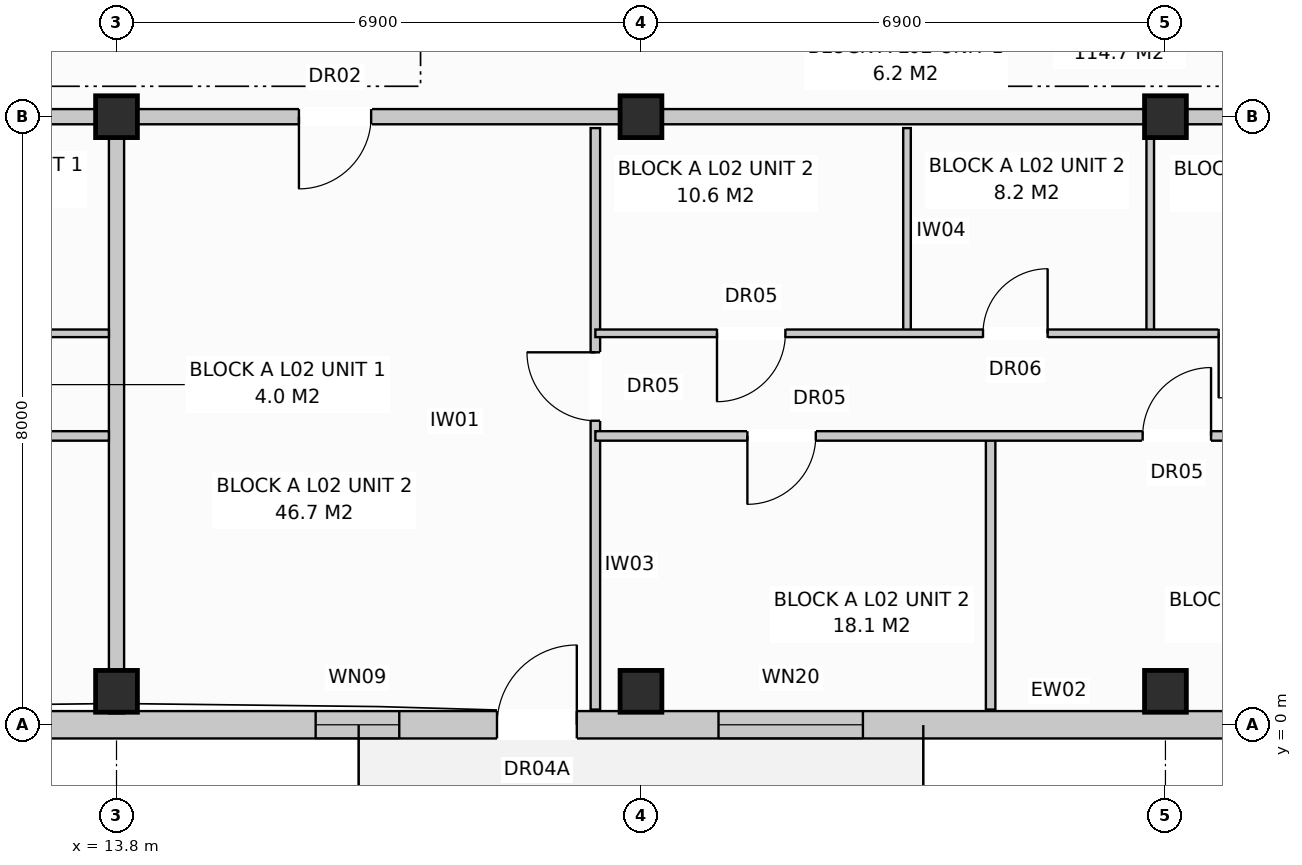
"""IFC4 building model, lengths in metres.
Left out: names, types, materials, properties, quantities, classifications, styles, units other than length and angle.
Written with IfcOpenShell. Run it as: python <this file> out.ifc"""

import sys

from ifc_helpers import new_model, si_unit, direction, frame, frame_2d, origin, origin_with_axes, origin_2d, place, context, subcontext, project, spatial, rectangle, extrude, element, fill, save


model = new_model("IFC4")
c1 = context("Model", 3, precision=1e-05, world=origin(), true_north=direction((0.0, 1.0)))
c2 = subcontext(c1, "Body", "Model", "MODEL_VIEW")
j1 = project(units=[si_unit("LENGTHUNIT", "METRE"), si_unit("PLANEANGLEUNIT", "RADIAN")], contexts=[c1])
p1 = place(None, origin())
s1 = spatial("IfcSite", under=j1, at=p1, CompositionType="ELEMENT")
p2 = place(p1, origin())
s2 = spatial("IfcBuilding", under=s1, at=p2, CompositionType="ELEMENT")
p3 = place(p2, frame((0.0, 0.0, 8.0)))
s3 = spatial("IfcBuildingStorey", under=s2, at=p3, CompositionType="ELEMENT", Elevation=8.0)
for number, where, z_axis, x_axis in (
    (1, (13.8, 0.44, 0.0), (0.0, 0.0, 1.0), (1.0, 0.0, 0.0)),
    (2, (13.8, 8.0, 0.0), (0.0, 0.0, 1.0), (1.0, 0.0, 0.0)),
    (3, (20.7, 0.44, 0.0), (0.0, 0.0, 1.0), (1.0, 0.0, 0.0)),
    (4, (20.7, 8.0, 0.0), (0.0, 0.0, 1.0), (1.0, 0.0, 0.0)),
    (5, (27.6, 0.44, 0.0), (0.0, 0.0, 1.0), (1.0, 0.0, 0.0)),
    (6, (27.6, 8.0, 0.0), (0.0, 0.0, 1.0), (1.0, 0.0, 0.0)),
):
    element("IfcColumn", number, at=place(p3, frame(where, z_axis=z_axis, x_axis=x_axis)), inside=s3, PredefinedType="COLUMN", context=c2, shape_type="SweptSolid", body=[
        extrude(rectangle(XDim=0.55, YDim=0.55, at=origin_2d()), origin(), (0.0, 0.0, 1.0), 3.2),
    ])
p4 = place(p3, frame((0.17, 0.0, 0.0), z_axis=(0.0, 0.0, 1.0), x_axis=(1.0, 0.0, 0.0)))
e7 = element("IfcWall", 7, at=p4, inside=s3, PredefinedType="STANDARD", context=c2, shape_type="SweptSolid", body=[
    extrude(rectangle(XDim=54.86, YDim=0.36, at=frame_2d((27.43, 0.0))), origin(), (0.0, 0.0, 1.0), 2.94),
])
p5 = place(p4, frame((3.736, 0.0, 0.0)))
e8 = element("IfcOpeningElement", 8, at=p5, cuts=e7, PredefinedType="OPENING", context=c2, shape_type="SweptSolid", body=[
    extrude(rectangle(XDim=1.05, YDim=2.12, at=frame_2d((0.525, 1.06))), frame((0.0, 0.192, 0.0), z_axis=(0.0, -1.0, 0.0), x_axis=(1.0, 0.0, 0.0)), (0.0, 0.0, 1.0), 0.384),
])
p6 = place(p4, frame((18.636, 0.0, 0.0)))
e9 = element("IfcOpeningElement", 9, at=p6, cuts=e7, PredefinedType="OPENING", context=c2, shape_type="SweptSolid", body=[
    extrude(rectangle(XDim=1.05, YDim=2.12, at=frame_2d((0.525, 1.06))), frame((0.0, 0.192, 0.0), z_axis=(0.0, -1.0, 0.0), x_axis=(1.0, 0.0, 0.0)), (0.0, 0.0, 1.0), 0.384),
])
p7 = place(p4, frame((32.636, 0.0, 0.0)))
e10 = element("IfcOpeningElement", 10, at=p7, cuts=e7, PredefinedType="OPENING", context=c2, shape_type="SweptSolid", body=[
    extrude(rectangle(XDim=1.05, YDim=2.12, at=frame_2d((0.525, 1.06))), frame((0.0, 0.192, 0.0), z_axis=(0.0, -1.0, 0.0), x_axis=(1.0, 0.0, 0.0)), (0.0, 0.0, 1.0), 0.384),
])
p8 = place(p4, frame((46.441, 0.0, 0.0)))
e11 = element("IfcOpeningElement", 11, at=p8, cuts=e7, PredefinedType="OPENING", context=c2, shape_type="SweptSolid", body=[
    extrude(rectangle(XDim=1.05, YDim=2.12, at=frame_2d((0.525, 1.06))), frame((0.0, 0.192, 0.0), z_axis=(0.0, -1.0, 0.0), x_axis=(1.0, 0.0, 0.0)), (0.0, 0.0, 1.0), 0.384),
])
p9 = place(p4, frame((1.95, 0.0, 0.72)))
e12 = element("IfcOpeningElement", 12, at=p9, cuts=e7, PredefinedType="OPENING", context=c2, shape_type="SweptSolid", body=[
    extrude(rectangle(XDim=1.1, YDim=1.5, at=frame_2d((0.55, 0.75))), frame((0.0, 0.192, 0.0), z_axis=(0.0, -1.0, 0.0), x_axis=(1.0, 0.0, 0.0)), (0.0, 0.0, 1.0), 0.384),
])
p10 = place(p4, frame((7.232, 0.0, 0.72)))
e13 = element("IfcOpeningElement", 13, at=p10, cuts=e7, PredefinedType="OPENING", context=c2, shape_type="SweptSolid", body=[
    extrude(rectangle(XDim=1.9, YDim=1.85, at=frame_2d((0.95, 0.925))), frame((0.0, 0.192, 0.0), z_axis=(0.0, -1.0, 0.0), x_axis=(1.0, 0.0, 0.0)), (0.0, 0.0, 1.0), 0.384),
])
p11 = place(p4, frame((10.85, 0.0, 0.72)))
e14 = element("IfcOpeningElement", 14, at=p11, cuts=e7, PredefinedType="OPENING", context=c2, shape_type="SweptSolid", body=[
    extrude(rectangle(XDim=1.1, YDim=1.5, at=frame_2d((0.55, 0.75))), frame((0.0, 0.192, 0.0), z_axis=(0.0, -1.0, 0.0), x_axis=(1.0, 0.0, 0.0)), (0.0, 0.0, 1.0), 0.384),
])
p12 = place(p4, frame((16.25, 0.0, 0.72)))
e15 = element("IfcOpeningElement", 15, at=p12, cuts=e7, PredefinedType="OPENING", context=c2, shape_type="SweptSolid", body=[
    extrude(rectangle(XDim=1.1, YDim=1.5, at=frame_2d((0.55, 0.75))), frame((0.0, 0.192, 0.0), z_axis=(0.0, -1.0, 0.0), x_axis=(1.0, 0.0, 0.0)), (0.0, 0.0, 1.0), 0.384),
])
p13 = place(p4, frame((21.55, 0.0, 0.72)))
e16 = element("IfcOpeningElement", 16, at=p13, cuts=e7, PredefinedType="OPENING", context=c2, shape_type="SweptSolid", body=[
    extrude(rectangle(XDim=1.9, YDim=1.85, at=frame_2d((0.95, 0.925))), frame((0.0, 0.192, 0.0), z_axis=(0.0, -1.0, 0.0), x_axis=(1.0, 0.0, 0.0)), (0.0, 0.0, 1.0), 0.384),
])
p14 = place(p4, frame((28.35, 0.0, 0.72)))
e17 = element("IfcOpeningElement", 17, at=p14, cuts=e7, PredefinedType="OPENING", context=c2, shape_type="SweptSolid", body=[
    extrude(rectangle(XDim=1.1, YDim=1.5, at=frame_2d((0.55, 0.75))), frame((0.0, 0.192, 0.0), z_axis=(0.0, -1.0, 0.0), x_axis=(1.0, 0.0, 0.0)), (0.0, 0.0, 1.0), 0.384),
])
p15 = place(p4, frame((30.8, 0.0, 0.85)))
e18 = element("IfcOpeningElement", 18, at=p15, cuts=e7, PredefinedType="OPENING", context=c2, shape_type="SweptSolid", body=[
    extrude(rectangle(XDim=1.5, YDim=1.65, at=frame_2d((0.75, 0.825))), frame((0.0, 0.192, 0.0), z_axis=(0.0, -1.0, 0.0), x_axis=(1.0, 0.0, 0.0)), (0.0, 0.0, 1.0), 0.384),
])
p16 = place(p4, frame((35.55, 0.0, 0.72)))
e19 = element("IfcOpeningElement", 19, at=p16, cuts=e7, PredefinedType="OPENING", context=c2, shape_type="SweptSolid", body=[
    extrude(rectangle(XDim=1.9, YDim=1.85, at=frame_2d((0.95, 0.925))), frame((0.0, 0.192, 0.0), z_axis=(0.0, -1.0, 0.0), x_axis=(1.0, 0.0, 0.0)), (0.0, 0.0, 1.0), 0.384),
])
p17 = place(p4, frame((39.25, 0.0, 0.72)))
e20 = element("IfcOpeningElement", 20, at=p17, cuts=e7, PredefinedType="OPENING", context=c2, shape_type="SweptSolid", body=[
    extrude(rectangle(XDim=1.1, YDim=1.5, at=frame_2d((0.55, 0.75))), frame((0.0, 0.192, 0.0), z_axis=(0.0, -1.0, 0.0), x_axis=(1.0, 0.0, 0.0)), (0.0, 0.0, 1.0), 0.384),
])
p18 = place(p4, frame((44.3, 0.0, 0.8)))
e21 = element("IfcOpeningElement", 21, at=p18, cuts=e7, PredefinedType="OPENING", context=c2, shape_type="SweptSolid", body=[
    extrude(rectangle(XDim=1.8, YDim=1.7, at=frame_2d((0.9, 0.85))), frame((0.0, 0.192, 0.0), z_axis=(0.0, -1.0, 0.0), x_axis=(1.0, 0.0, 0.0)), (0.0, 0.0, 1.0), 0.384),
])
p19 = place(p4, frame((49.15, 0.0, 0.72)))
e22 = element("IfcOpeningElement", 22, at=p19, cuts=e7, PredefinedType="OPENING", context=c2, shape_type="SweptSolid", body=[
    extrude(rectangle(XDim=1.9, YDim=1.85, at=frame_2d((0.95, 0.925))), frame((0.0, 0.192, 0.0), z_axis=(0.0, -1.0, 0.0), x_axis=(1.0, 0.0, 0.0)), (0.0, 0.0, 1.0), 0.384),
])
p20 = place(p4, frame((52.95, 0.0, 0.72)))
e23 = element("IfcOpeningElement", 23, at=p20, cuts=e7, PredefinedType="OPENING", context=c2, shape_type="SweptSolid", body=[
    extrude(rectangle(XDim=1.1, YDim=1.5, at=frame_2d((0.55, 0.75))), frame((0.0, 0.192, 0.0), z_axis=(0.0, -1.0, 0.0), x_axis=(1.0, 0.0, 0.0)), (0.0, 0.0, 1.0), 0.384),
])
p21 = place(p3, frame((13.8, 7.85, 0.0), z_axis=(0.0, 0.0, 1.0), x_axis=(0.0, -1.0, 0.0)))
e24 = element("IfcWall", 24, at=p21, inside=s3, PredefinedType="PARTITIONING", context=c2, shape_type="SweptSolid", body=[
    extrude(rectangle(XDim=7.7, YDim=0.2, at=frame_2d((3.85, 0.0))), origin(), (0.0, 0.0, 1.0), 2.94),
])
p22 = place(p3, frame((0.0, 8.0, 0.0), z_axis=(0.0, 0.0, 1.0), x_axis=(1.0, 0.0, 0.0)))
e25 = element("IfcWall", 25, at=p22, inside=s3, PredefinedType="PARTITIONING", context=c2, shape_type="SweptSolid", body=[
    extrude(rectangle(XDim=13.8, YDim=0.2, at=frame_2d((6.9, 0.0))), origin(), (0.0, 0.0, 1.0), 2.38),
])
p23 = place(p22, frame((2.4, 0.0, 0.0)))
e26 = element("IfcOpeningElement", 26, at=p23, cuts=e25, PredefinedType="OPENING", context=c2, shape_type="SweptSolid", body=[
    extrude(rectangle(XDim=0.95, YDim=2.15, at=frame_2d((0.475, 1.075))), frame((0.0, 0.112, 0.0), z_axis=(0.0, -1.0, 0.0), x_axis=(1.0, 0.0, 0.0)), (0.0, 0.0, 1.0), 0.224),
])
p24 = place(p3, frame((5.2, 5.15, 0.0), z_axis=(0.0, 0.0, 1.0), x_axis=(1.0, 0.0, 0.0)))
e27 = element("IfcWall", 27, at=p24, inside=s3, PredefinedType="PARTITIONING", context=c2, shape_type="SweptSolid", body=[
    extrude(rectangle(XDim=8.5, YDim=0.1, at=frame_2d((4.25, 0.0))), origin(), (0.0, 0.0, 1.0), 2.94),
])
p25 = place(p24, frame((1.0, 0.0, 0.0)))
e28 = element("IfcOpeningElement", 28, at=p25, cuts=e27, PredefinedType="OPENING", context=c2, shape_type="SweptSolid", body=[
    extrude(rectangle(XDim=0.85, YDim=2.1, at=frame_2d((0.425, 1.05))), frame((0.0, 0.062, 0.0), z_axis=(0.0, -1.0, 0.0), x_axis=(1.0, 0.0, 0.0)), (0.0, 0.0, 1.0), 0.124),
])
p26 = place(p24, frame((3.4, 0.0, 0.0)))
e29 = element("IfcOpeningElement", 29, at=p26, cuts=e27, PredefinedType="OPENING", context=c2, shape_type="SweptSolid", body=[
    extrude(rectangle(XDim=0.85, YDim=2.05, at=frame_2d((0.425, 1.025))), frame((0.0, 0.062, 0.0), z_axis=(0.0, -1.0, 0.0), x_axis=(1.0, 0.0, 0.0)), (0.0, 0.0, 1.0), 0.124),
])
p27 = place(p24, frame((6.2, 0.0, 0.0)))
e30 = element("IfcOpeningElement", 30, at=p27, cuts=e27, PredefinedType="OPENING", context=c2, shape_type="SweptSolid", body=[
    extrude(rectangle(XDim=0.85, YDim=2.05, at=frame_2d((0.425, 1.025))), frame((0.0, 0.062, 0.0), z_axis=(0.0, -1.0, 0.0), x_axis=(1.0, 0.0, 0.0)), (0.0, 0.0, 1.0), 0.124),
])
p28 = place(p3, frame((5.2, 3.8, 0.0), z_axis=(0.0, 0.0, 1.0), x_axis=(1.0, 0.0, 0.0)))
e31 = element("IfcWall", 31, at=p28, inside=s3, PredefinedType="PARTITIONING", context=c2, shape_type="SweptSolid", body=[
    extrude(rectangle(XDim=8.5, YDim=0.125, at=frame_2d((4.25, 0.0))), origin(), (0.0, 0.0, 1.0), 2.94),
])
p29 = place(p28, frame((1.5, 0.0, 0.0)))
e32 = element("IfcOpeningElement", 32, at=p29, cuts=e31, PredefinedType="OPENING", context=c2, shape_type="SweptSolid", body=[
    extrude(rectangle(XDim=0.9, YDim=2.1, at=frame_2d((0.45, 1.05))), frame((0.0, 0.074, 0.0), z_axis=(0.0, -1.0, 0.0), x_axis=(1.0, 0.0, 0.0)), (0.0, 0.0, 1.0), 0.149),
])
p30 = place(p28, frame((5.6, 0.0, 0.0)))
e33 = element("IfcOpeningElement", 33, at=p30, cuts=e31, PredefinedType="OPENING", context=c2, shape_type="SweptSolid", body=[
    extrude(rectangle(XDim=0.9, YDim=2.1, at=frame_2d((0.45, 1.05))), frame((0.0, 0.074, 0.0), z_axis=(0.0, -1.0, 0.0), x_axis=(1.0, 0.0, 0.0)), (0.0, 0.0, 1.0), 0.149),
])
p31 = place(p3, frame((13.8, 8.0, 0.0), z_axis=(0.0, 0.0, 1.0), x_axis=(1.0, 0.0, 0.0)))
e34 = element("IfcWall", 34, at=p31, inside=s3, PredefinedType="PARTITIONING", context=c2, shape_type="SweptSolid", body=[
    extrude(rectangle(XDim=20.7, YDim=0.2, at=frame_2d((10.35, 0.0))), origin(), (0.0, 0.0, 1.0), 2.38),
])
p32 = place(p31, frame((2.4, 0.0, 0.0)))
e35 = element("IfcOpeningElement", 35, at=p32, cuts=e34, PredefinedType="OPENING", context=c2, shape_type="SweptSolid", body=[
    extrude(rectangle(XDim=0.95, YDim=2.15, at=frame_2d((0.475, 1.075))), frame((0.0, 0.112, 0.0), z_axis=(0.0, -1.0, 0.0), x_axis=(1.0, 0.0, 0.0)), (0.0, 0.0, 1.0), 0.224),
])
p33 = place(p3, frame((20.1, 7.85, 0.0), z_axis=(0.0, 0.0, 1.0), x_axis=(0.0, -1.0, 0.0)))
e36 = element("IfcWall", 36, at=p33, inside=s3, PredefinedType="PARTITIONING", context=c2, shape_type="SweptSolid", body=[
    extrude(rectangle(XDim=7.65, YDim=0.125, at=frame_2d((3.825, 0.0))), origin(), (0.0, 0.0, 1.0), 2.94),
])
p34 = place(p33, frame((2.95, 0.0, 0.0)))
e37 = element("IfcOpeningElement", 37, at=p34, cuts=e36, PredefinedType="OPENING", context=c2, shape_type="SweptSolid", body=[
    extrude(rectangle(XDim=0.9, YDim=2.1, at=frame_2d((0.45, 1.05))), frame((0.0, 0.074, 0.0), z_axis=(0.0, -1.0, 0.0), x_axis=(1.0, 0.0, 0.0)), (0.0, 0.0, 1.0), 0.149),
])
for number, where, z_axis, x_axis in (
    (38, (24.2, 7.85, 0.0), (0.0, 0.0, 1.0), (0.0, -1.0, 0.0)),
    (39, (27.4, 7.85, 0.0), (0.0, 0.0, 1.0), (0.0, -1.0, 0.0)),
):
    element("IfcWall", number, at=place(p3, frame(where, z_axis=z_axis, x_axis=x_axis)), inside=s3, PredefinedType="PARTITIONING", context=c2, shape_type="SweptSolid", body=[
        extrude(rectangle(XDim=2.7, YDim=0.1, at=frame_2d((1.35, 0.0))), origin(), (0.0, 0.0, 1.0), 2.94),
    ])
p35 = place(p3, frame((25.3, 3.8, 0.0), z_axis=(0.0, 0.0, 1.0), x_axis=(0.0, -1.0, 0.0)))
e40 = element("IfcWall", 40, at=p35, inside=s3, PredefinedType="PARTITIONING", context=c2, shape_type="SweptSolid", body=[
    extrude(rectangle(XDim=3.6, YDim=0.125, at=frame_2d((1.8, 0.0))), origin(), (0.0, 0.0, 1.0), 2.59),
])
p36 = place(p3, frame((20.1, 5.15, 0.0), z_axis=(0.0, 0.0, 1.0), x_axis=(1.0, 0.0, 0.0)))
e41 = element("IfcWall", 41, at=p36, inside=s3, PredefinedType="PARTITIONING", context=c2, shape_type="SweptSolid", body=[
    extrude(rectangle(XDim=14.3, YDim=0.1, at=frame_2d((7.15, 0.0))), origin(), (0.0, 0.0, 1.0), 2.94),
])
p37 = place(p36, frame((1.6, 0.0, 0.0)))
e42 = element("IfcOpeningElement", 42, at=p37, cuts=e41, PredefinedType="OPENING", context=c2, shape_type="SweptSolid", body=[
    extrude(rectangle(XDim=0.9, YDim=2.1, at=frame_2d((0.45, 1.05))), frame((0.0, 0.062, 0.0), z_axis=(0.0, -1.0, 0.0), x_axis=(1.0, 0.0, 0.0)), (0.0, 0.0, 1.0), 0.124),
])
p38 = place(p36, frame((5.1, 0.0, 0.0)))
e43 = element("IfcOpeningElement", 43, at=p38, cuts=e41, PredefinedType="OPENING", context=c2, shape_type="SweptSolid", body=[
    extrude(rectangle(XDim=0.85, YDim=2.05, at=frame_2d((0.425, 1.025))), frame((0.0, 0.062, 0.0), z_axis=(0.0, -1.0, 0.0), x_axis=(1.0, 0.0, 0.0)), (0.0, 0.0, 1.0), 0.124),
])
p39 = place(p36, frame((8.2, 0.0, 0.0)))
e44 = element("IfcOpeningElement", 44, at=p39, cuts=e41, PredefinedType="OPENING", context=c2, shape_type="SweptSolid", body=[
    extrude(rectangle(XDim=0.85, YDim=2.05, at=frame_2d((0.425, 1.025))), frame((0.0, 0.062, 0.0), z_axis=(0.0, -1.0, 0.0), x_axis=(1.0, 0.0, 0.0)), (0.0, 0.0, 1.0), 0.124),
])
p40 = place(p36, frame((11.6, 0.0, 0.0)))
e45 = element("IfcOpeningElement", 45, at=p40, cuts=e41, PredefinedType="OPENING", context=c2, shape_type="SweptSolid", body=[
    extrude(rectangle(XDim=0.85, YDim=2.05, at=frame_2d((0.425, 1.025))), frame((0.0, 0.062, 0.0), z_axis=(0.0, -1.0, 0.0), x_axis=(1.0, 0.0, 0.0)), (0.0, 0.0, 1.0), 0.124),
])
p41 = place(p3, frame((20.1, 3.8, 0.0), z_axis=(0.0, 0.0, 1.0), x_axis=(1.0, 0.0, 0.0)))
e46 = element("IfcWall", 46, at=p41, inside=s3, PredefinedType="PARTITIONING", context=c2, shape_type="SweptSolid", body=[
    extrude(rectangle(XDim=10.4, YDim=0.125, at=frame_2d((5.2, 0.0))), origin(), (0.0, 0.0, 1.0), 2.94),
])
p42 = place(p41, frame((2.0, 0.0, 0.0)))
e47 = element("IfcOpeningElement", 47, at=p42, cuts=e46, PredefinedType="OPENING", context=c2, shape_type="SweptSolid", body=[
    extrude(rectangle(XDim=0.9, YDim=2.1, at=frame_2d((0.45, 1.05))), frame((0.0, 0.074, 0.0), z_axis=(0.0, -1.0, 0.0), x_axis=(1.0, 0.0, 0.0)), (0.0, 0.0, 1.0), 0.149),
])
p43 = place(p41, frame((7.2, 0.0, 0.0)))
e48 = element("IfcOpeningElement", 48, at=p43, cuts=e46, PredefinedType="OPENING", context=c2, shape_type="SweptSolid", body=[
    extrude(rectangle(XDim=0.9, YDim=2.1, at=frame_2d((0.45, 1.05))), frame((0.0, 0.074, 0.0), z_axis=(0.0, -1.0, 0.0), x_axis=(1.0, 0.0, 0.0)), (0.0, 0.0, 1.0), 0.149),
])
p44 = place(p6, origin_with_axes())
e49 = element("IfcDoor", 49, at=p44, inside=s3, OperationType="SINGLE_SWING_RIGHT", PredefinedType="DOOR", context=c2, shape_type="SweptSolid", body=[
    extrude(rectangle(XDim=1.05, YDim=2.12, at=frame_2d((0.525, 1.06))), frame((0.0, 0.025, 0.0), z_axis=(0.0, -1.0, 0.0), x_axis=(1.0, 0.0, 0.0)), (0.0, 0.0, 1.0), 0.05),
])
fill(e9, e49)
p45 = place(p12, origin_with_axes())
e50 = element("IfcWindow", 50, at=p45, inside=s3, PartitioningType="SINGLE_PANEL", PredefinedType="WINDOW", context=c2, shape_type="SweptSolid", body=[
    extrude(rectangle(XDim=1.1, YDim=1.5, at=frame_2d((0.55, 0.75))), frame((0.0, 0.03, 0.0), z_axis=(0.0, -1.0, 0.0), x_axis=(1.0, 0.0, 0.0)), (0.0, 0.0, 1.0), 0.06),
])
fill(e15, e50)
p46 = place(p13, origin_with_axes())
e51 = element("IfcWindow", 51, at=p46, inside=s3, PartitioningType="SINGLE_PANEL", PredefinedType="WINDOW", context=c2, shape_type="SweptSolid", body=[
    extrude(rectangle(XDim=1.9, YDim=1.85, at=frame_2d((0.95, 0.925))), frame((0.0, 0.03, 0.0), z_axis=(0.0, -1.0, 0.0), x_axis=(1.0, 0.0, 0.0)), (0.0, 0.0, 1.0), 0.06),
])
fill(e16, e51)
p47 = place(p32, frame((0.95, 0.0, 0.0), z_axis=(0.0, 0.0, 1.0), x_axis=(-1.0, 0.0, 0.0)))
e52 = element("IfcDoor", 52, at=p47, inside=s3, OperationType="SINGLE_SWING_LEFT", PredefinedType="DOOR", context=c2, shape_type="SweptSolid", body=[
    extrude(rectangle(XDim=0.95, YDim=2.15, at=frame_2d((0.475, 1.075))), frame((0.0, 0.025, 0.0), z_axis=(0.0, -1.0, 0.0), x_axis=(1.0, 0.0, 0.0)), (0.0, 0.0, 1.0), 0.05),
])
fill(e35, e52)
p48 = place(p34, frame((0.9, 0.0, 0.0), z_axis=(0.0, 0.0, 1.0), x_axis=(-1.0, 0.0, 0.0)))
e53 = element("IfcDoor", 53, at=p48, inside=s3, OperationType="SINGLE_SWING_LEFT", PredefinedType="DOOR", context=c2, shape_type="SweptSolid", body=[
    extrude(rectangle(XDim=0.9, YDim=2.1, at=frame_2d((0.45, 1.05))), frame((0.0, 0.025, 0.0), z_axis=(0.0, -1.0, 0.0), x_axis=(1.0, 0.0, 0.0)), (0.0, 0.0, 1.0), 0.05),
])
fill(e37, e53)
p49 = place(p37, frame((0.9, 0.0, 0.0), z_axis=(0.0, 0.0, 1.0), x_axis=(-1.0, 0.0, 0.0)))
e54 = element("IfcDoor", 54, at=p49, inside=s3, OperationType="SINGLE_SWING_LEFT", PredefinedType="DOOR", context=c2, shape_type="SweptSolid", body=[
    extrude(rectangle(XDim=0.9, YDim=2.1, at=frame_2d((0.45, 1.05))), frame((0.0, 0.025, 0.0), z_axis=(0.0, -1.0, 0.0), x_axis=(1.0, 0.0, 0.0)), (0.0, 0.0, 1.0), 0.05),
])
fill(e42, e54)
p50 = place(p38, origin_with_axes())
e55 = element("IfcDoor", 55, at=p50, inside=s3, OperationType="SINGLE_SWING_RIGHT", PredefinedType="DOOR", context=c2, shape_type="SweptSolid", body=[
    extrude(rectangle(XDim=0.85, YDim=2.05, at=frame_2d((0.425, 1.025))), frame((0.0, 0.025, 0.0), z_axis=(0.0, -1.0, 0.0), x_axis=(1.0, 0.0, 0.0)), (0.0, 0.0, 1.0), 0.05),
])
fill(e43, e55)
p51 = place(p39, frame((0.85, 0.0, 0.0), z_axis=(0.0, 0.0, 1.0), x_axis=(-1.0, 0.0, 0.0)))
e56 = element("IfcDoor", 56, at=p51, inside=s3, OperationType="SINGLE_SWING_LEFT", PredefinedType="DOOR", context=c2, shape_type="SweptSolid", body=[
    extrude(rectangle(XDim=0.85, YDim=2.05, at=frame_2d((0.425, 1.025))), frame((0.0, 0.025, 0.0), z_axis=(0.0, -1.0, 0.0), x_axis=(1.0, 0.0, 0.0)), (0.0, 0.0, 1.0), 0.05),
])
fill(e44, e56)
p52 = place(p42, frame((0.9, 0.0, 0.0), z_axis=(0.0, 0.0, 1.0), x_axis=(-1.0, 0.0, 0.0)))
e57 = element("IfcDoor", 57, at=p52, inside=s3, OperationType="SINGLE_SWING_LEFT", PredefinedType="DOOR", context=c2, shape_type="SweptSolid", body=[
    extrude(rectangle(XDim=0.9, YDim=2.1, at=frame_2d((0.45, 1.05))), frame((0.0, 0.025, 0.0), z_axis=(0.0, -1.0, 0.0), x_axis=(1.0, 0.0, 0.0)), (0.0, 0.0, 1.0), 0.05),
])
fill(e47, e57)
p53 = place(p43, origin_with_axes())
e58 = element("IfcDoor", 58, at=p53, inside=s3, OperationType="SINGLE_SWING_RIGHT", PredefinedType="DOOR", context=c2, shape_type="SweptSolid", body=[
    extrude(rectangle(XDim=0.9, YDim=2.1, at=frame_2d((0.45, 1.05))), frame((0.0, 0.025, 0.0), z_axis=(0.0, -1.0, 0.0), x_axis=(1.0, 0.0, 0.0)), (0.0, 0.0, 1.0), 0.05),
])
fill(e48, e58)
save(model, sys.argv[1])
